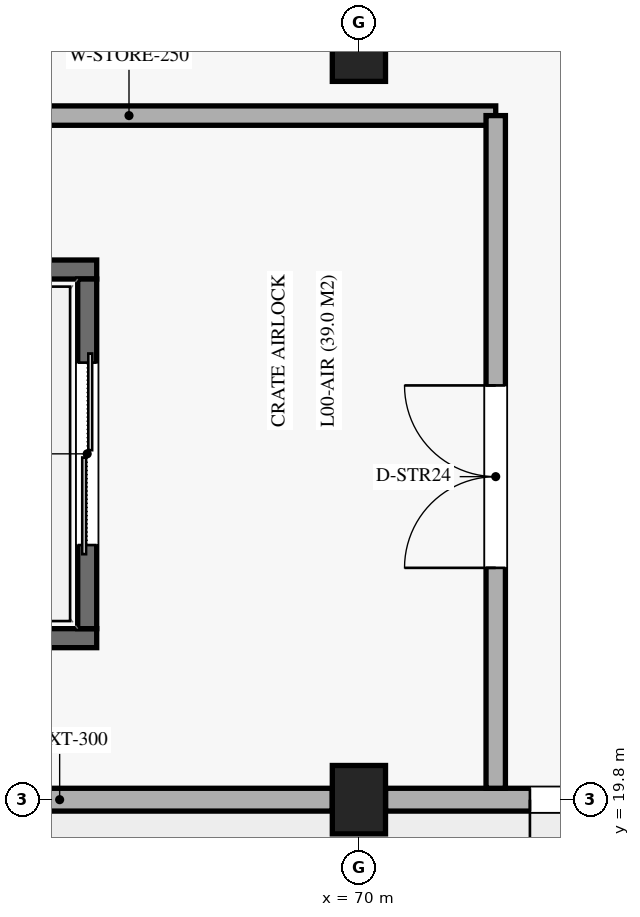
"""IFC4 building model, lengths in metres.
Left out: names, types, materials, properties, quantities, classifications, styles, units other than length and angle.
Written with IfcOpenShell. Run it as: python <this file> out.ifc"""

import sys

from ifc_helpers import new_model, si_unit, direction, frame, frame_2d, origin, origin_2d, place, context, subcontext, project, spatial, rectangle, extrude, element, fill, save


model = new_model("IFC4")
c1 = context("Model", 3, precision=1e-05, world=origin(), true_north=direction((0.0, 1.0)))
c2 = subcontext(c1, "Body", "Model", "MODEL_VIEW")
j1 = project(units=[si_unit("LENGTHUNIT", "METRE"), si_unit("PLANEANGLEUNIT", "RADIAN")], contexts=[c1])
p1 = place(None, origin())
s1 = spatial("IfcSite", under=j1, at=p1, CompositionType="ELEMENT")
p2 = place(p1, origin())
s2 = spatial("IfcBuilding", under=s1, at=p2, CompositionType="ELEMENT")
p3 = place(p2, origin())
s3 = spatial("IfcBuildingStorey", under=s2, at=p3, CompositionType="ELEMENT", Elevation=0.0)
for number, where, z_axis, x_axis in (
    (1, (70.0, 19.8, 0.0), (0.0, 0.0, 1.0), (1.0, 0.0, 0.0)),
    (2, (70.0, 29.7, 0.0), (0.0, 0.0, 1.0), (1.0, 0.0, 0.0)),
):
    element("IfcColumn", number, at=place(p3, frame(where, z_axis=z_axis, x_axis=x_axis)), inside=s3, PredefinedType="COLUMN", context=c2, shape_type="SweptSolid", body=[
        extrude(rectangle(XDim=0.7, YDim=0.9, at=origin_2d()), origin(), (0.0, 0.0, 1.0), 5.44),
    ])
p4 = place(p3, frame((62.475, 19.8, 0.0), z_axis=(0.0, 0.0, 1.0), x_axis=(1.0, 0.0, 0.0)))
e3 = element("IfcWall", 3, at=p4, inside=s3, PredefinedType="SOLIDWALL", context=c2, shape_type="SweptSolid", body=[
    extrude(rectangle(XDim=7.175, YDim=0.3, at=frame_2d((3.587, 0.0))), origin(), (0.0, 0.0, 1.0), 4.4),
])
p5 = place(p3, frame((70.35, 19.8, 0.0), z_axis=(0.0, 0.0, 1.0), x_axis=(1.0, 0.0, 0.0)))
e4 = element("IfcWall", 4, at=p5, inside=s3, PredefinedType="SOLIDWALL", context=c2, shape_type="SweptSolid", body=[
    extrude(rectangle(XDim=6.3, YDim=0.3, at=frame_2d((3.15, 0.0))), origin(), (0.0, 0.0, 1.0), 4.4),
])
p6 = place(p5, frame((1.9, 0.0, 0.0)))
e5 = element("IfcOpeningElement", 5, at=p6, cuts=e4, PredefinedType="OPENING", context=c2, shape_type="SweptSolid", body=[
    extrude(rectangle(XDim=2.6, YDim=2.5, at=frame_2d((1.3, 1.25))), frame((0.0, 0.16, 0.0), z_axis=(0.0, -1.0, 0.0), x_axis=(1.0, 0.0, 0.0)), (0.0, 0.0, 1.0), 0.32),
])
for number, where, z_axis, x_axis in (
    (6, (62.65, 21.925, 0.0), (0.0, 0.0, 1.0), (1.0, 0.0, 0.0)),
    (7, (62.65, 26.775, 0.0), (0.0, 0.0, 1.0), (1.0, 0.0, 0.0)),
):
    element("IfcWall", number, at=place(p3, frame(where, z_axis=z_axis, x_axis=x_axis)), inside=s3, PredefinedType="SOLIDWALL", context=c2, shape_type="SweptSolid", body=[
        extrude(rectangle(XDim=3.9, YDim=0.25, at=frame_2d((1.95, 0.0))), origin(), (0.0, 0.0, 1.0), 5.16),
    ])
p7 = place(p3, frame((66.425, 22.05, 0.0), z_axis=(0.0, 0.0, 1.0), x_axis=(0.0, 1.0, 0.0)))
e8 = element("IfcWall", 8, at=p7, inside=s3, PredefinedType="SOLIDWALL", context=c2, shape_type="SweptSolid", body=[
    extrude(rectangle(XDim=4.6, YDim=0.25, at=frame_2d((2.3, 0.0))), origin(), (0.0, 0.0, 1.0), 5.16),
])
p8 = place(p7, frame((1.1, 0.0, 0.0)))
e9 = element("IfcOpeningElement", 9, at=p8, cuts=e8, PredefinedType="OPENING", context=c2, shape_type="SweptSolid", body=[
    extrude(rectangle(XDim=2.4, YDim=2.65, at=frame_2d((1.2, 1.325))), frame((0.0, 0.135, 0.0), z_axis=(0.0, -1.0, 0.0), x_axis=(1.0, 0.0, 0.0)), (0.0, 0.0, 1.0), 0.27),
])
p9 = place(p3, frame((62.15, 28.8, 0.0), z_axis=(0.0, 0.0, 1.0), x_axis=(1.0, 0.0, 0.0)))
e10 = element("IfcWall", 10, at=p9, inside=s3, PredefinedType="SOLIDWALL", context=c2, shape_type="SweptSolid", body=[
    extrude(rectangle(XDim=9.65, YDim=0.255, at=frame_2d((4.825, 0.0))), origin(), (0.0, 0.0, 1.0), 4.3),
])
p10 = place(p3, frame((71.8, 19.95, 0.0), z_axis=(0.0, 0.0, 1.0), x_axis=(0.0, 1.0, 0.0)))
e11 = element("IfcWall", 11, at=p10, inside=s3, PredefinedType="SOLIDWALL", context=c2, shape_type="SweptSolid", body=[
    extrude(rectangle(XDim=8.85, YDim=0.255, at=frame_2d((4.425, 0.0))), origin(), (0.0, 0.0, 1.0), 4.3),
])
p11 = place(p10, frame((2.9, 0.0, 0.0)))
e12 = element("IfcOpeningElement", 12, at=p11, cuts=e11, PredefinedType="OPENING", context=c2, shape_type="SweptSolid", body=[
    extrude(rectangle(XDim=2.4, YDim=2.5, at=frame_2d((1.2, 1.25))), frame((0.0, 0.137, 0.0), z_axis=(0.0, -1.0, 0.0), x_axis=(1.0, 0.0, 0.0)), (0.0, 0.0, 1.0), 0.275),
])
p12 = place(p6, frame((2.6, 0.0, 0.0), z_axis=(0.0, 0.0, 1.0), x_axis=(-1.0, 0.0, 0.0)))
e13 = element("IfcDoor", 13, at=p12, inside=s3, OperationType="DOUBLE_DOOR_SINGLE_SWING", PredefinedType="GATE", context=c2, shape_type="SweptSolid", body=[
    extrude(rectangle(XDim=2.6, YDim=2.5, at=frame_2d((1.3, 1.25))), frame((0.0, 0.025, 0.0), z_axis=(0.0, -1.0, 0.0), x_axis=(1.0, 0.0, 0.0)), (0.0, 0.0, 1.0), 0.05),
])
fill(e5, e13)
p13 = place(p8, origin())
e14 = element("IfcDoor", 14, at=p13, inside=s3, OperationType="DOUBLE_DOOR_SLIDING", PredefinedType="DOOR", context=c2, shape_type="SweptSolid", body=[
    extrude(rectangle(XDim=2.4, YDim=2.65, at=frame_2d((1.2, 1.325))), frame((0.0, 0.025, 0.0), z_axis=(0.0, -1.0, 0.0), x_axis=(1.0, 0.0, 0.0)), (0.0, 0.0, 1.0), 0.05),
])
fill(e9, e14)
p14 = place(p11, origin())
e15 = element("IfcDoor", 15, at=p14, inside=s3, OperationType="DOUBLE_DOOR_SINGLE_SWING", PredefinedType="DOOR", context=c2, shape_type="SweptSolid", body=[
    extrude(rectangle(XDim=2.4, YDim=2.5, at=frame_2d((1.2, 1.25))), frame((0.0, 0.025, 0.0), z_axis=(0.0, -1.0, 0.0), x_axis=(1.0, 0.0, 0.0)), (0.0, 0.0, 1.0), 0.05),
])
fill(e12, e15)
save(model, sys.argv[1])
